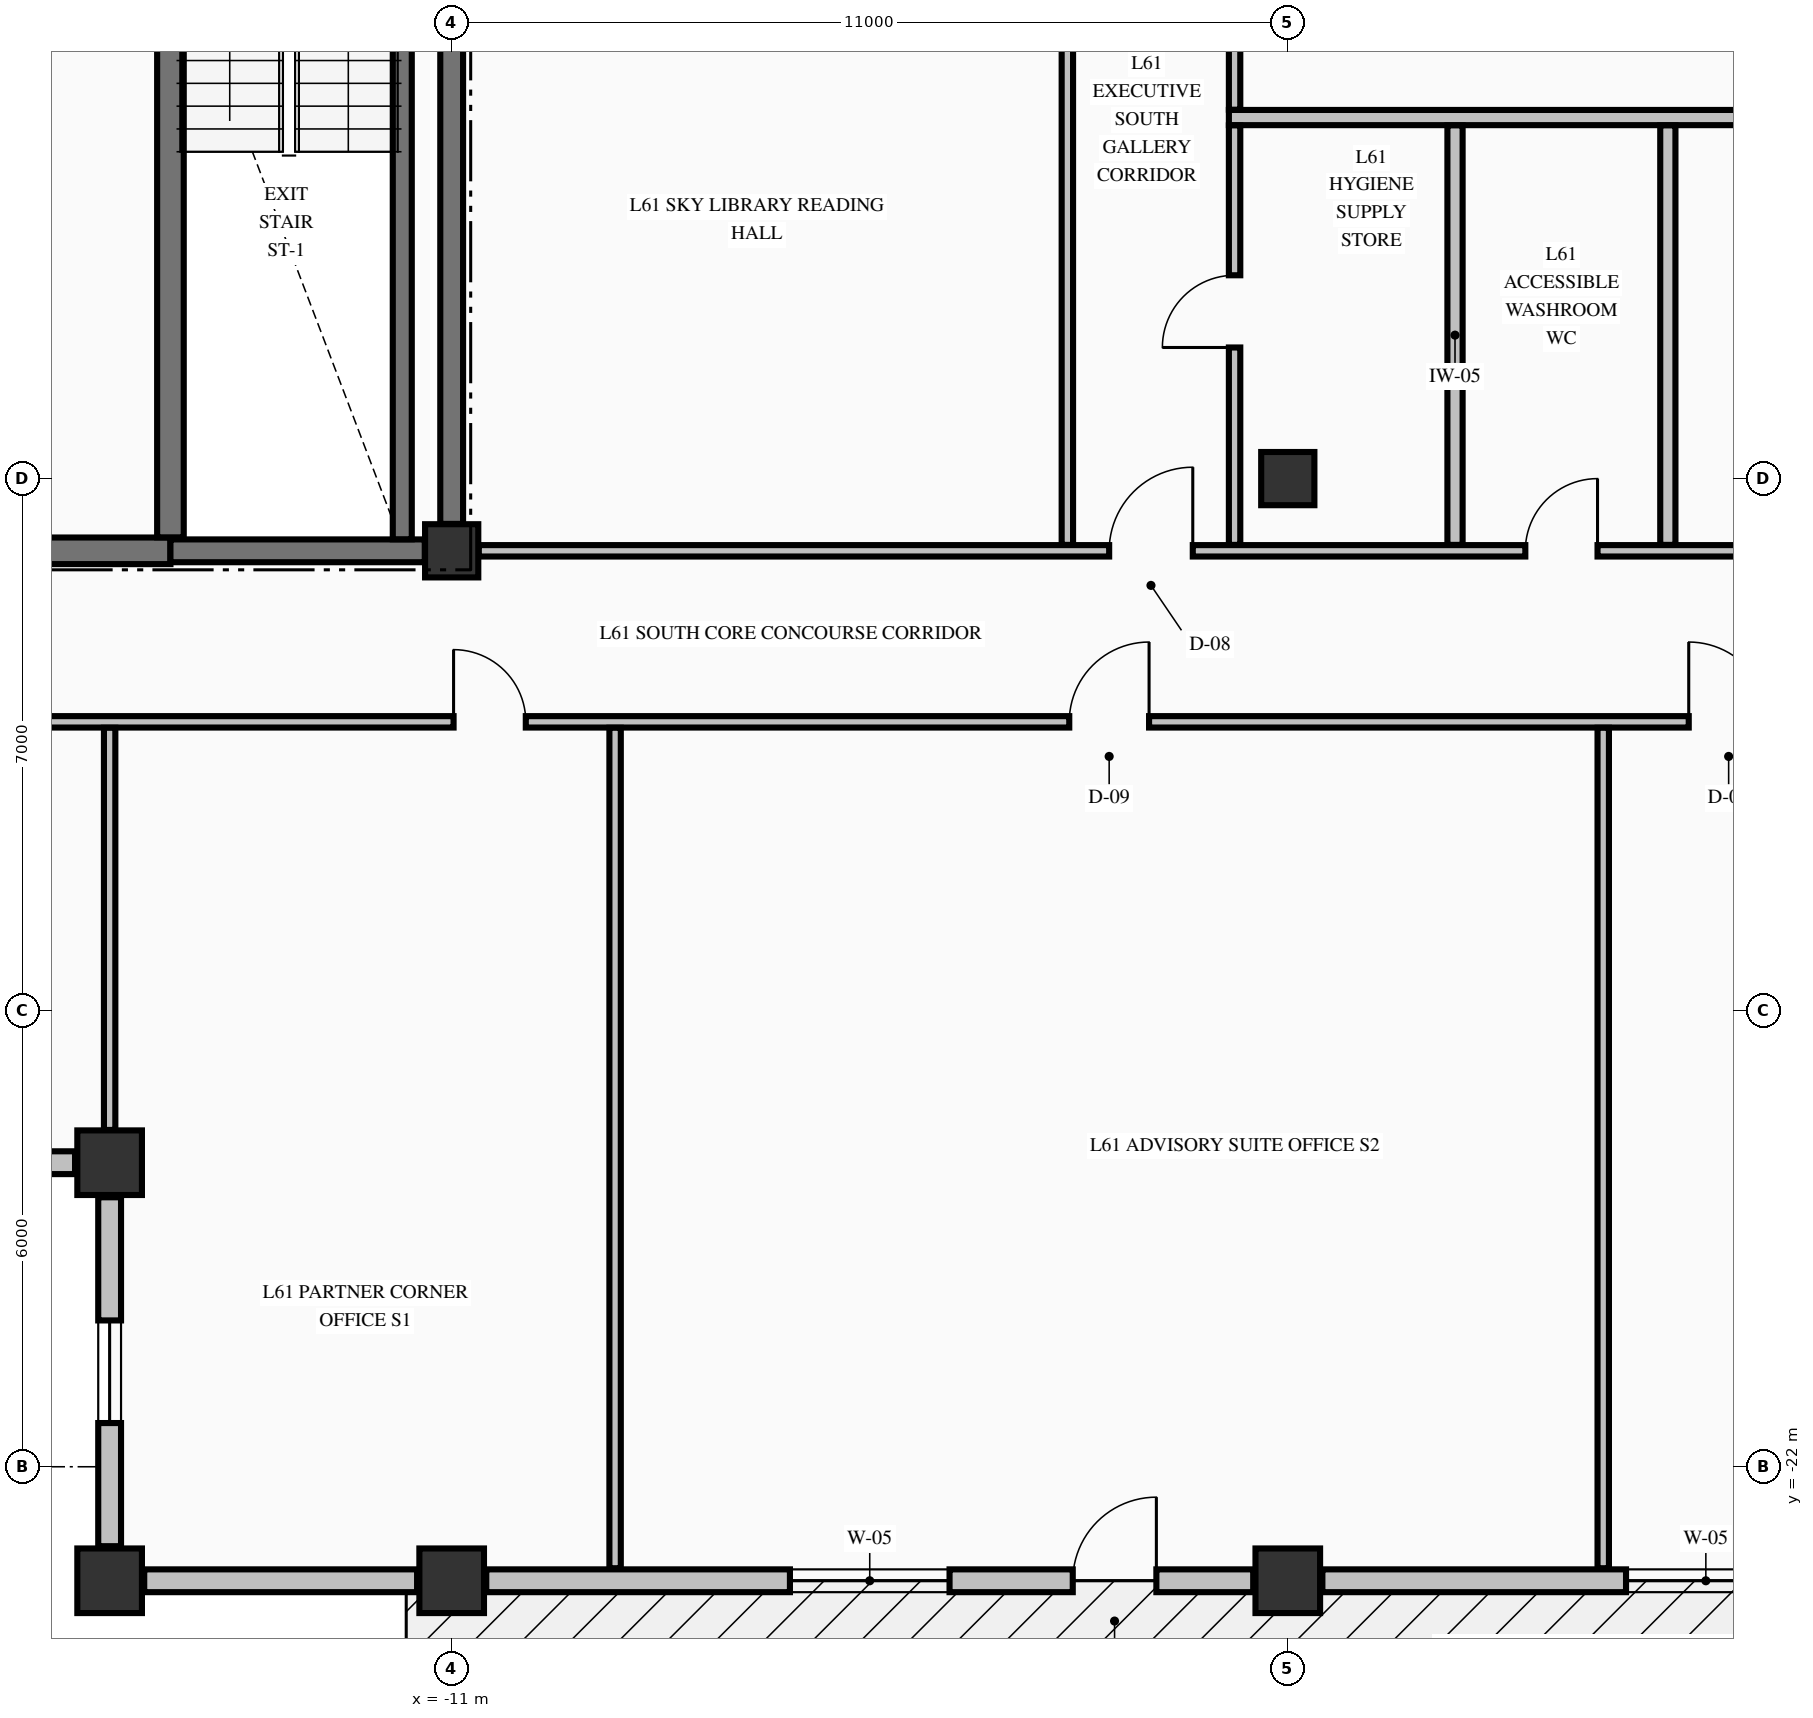
"""IFC4 building model, lengths in metres.
Left out: names, types, materials, properties, quantities, classifications, styles, units other than length and angle.
Written with IfcOpenShell. Run it as: python <this file> out.ifc"""

import sys

from ifc_helpers import new_model, si_unit, direction, frame, frame_2d, origin, origin_2d, place, context, subcontext, project, spatial, rectangle, extrude, element, fill, save


model = new_model("IFC4")
c1 = context("Model", 3, precision=1e-05, world=origin(), true_north=direction((0.0, 1.0)))
c2 = subcontext(c1, "Body", "Model", "MODEL_VIEW")
j1 = project(units=[si_unit("LENGTHUNIT", "METRE"), si_unit("PLANEANGLEUNIT", "RADIAN")], contexts=[c1])
p1 = place(None, origin())
s1 = spatial("IfcSite", under=j1, at=p1, CompositionType="ELEMENT")
p2 = place(p1, origin())
s2 = spatial("IfcBuilding", under=s1, at=p2, CompositionType="ELEMENT")
p3 = place(p2, frame((0.0, 0.0, 233.28)))
s3 = spatial("IfcBuildingStorey", under=s2, at=p3, CompositionType="ELEMENT", Elevation=233.28)
for number, where, z_axis, x_axis in (
    (1, (-15.5, -23.5, -0.25), (0.0, 0.0, 1.0), (1.0, 0.0, 0.0)),
    (2, (-11.0, -23.5, -0.25), (0.0, 0.0, 1.0), (1.0, 0.0, 0.0)),
    (3, (0.0, -23.5, -0.25), (0.0, 0.0, 1.0), (1.0, 0.0, 0.0)),
    (4, (-15.5, -18.0, -0.25), (0.0, 0.0, 1.0), (1.0, 0.0, 0.0)),
):
    element("IfcColumn", number, at=place(p3, frame(where, z_axis=z_axis, x_axis=x_axis)), inside=s3, PredefinedType="COLUMN", context=c2, shape_type="SweptSolid", body=[
        extrude(rectangle(XDim=0.85, YDim=0.85, at=origin_2d()), origin(), (0.0, 0.0, 1.0), 3.23),
    ])
for number, where, z_axis, x_axis in (
    (5, (-11.0, -9.95, -0.25), (0.0, 0.0, 1.0), (1.0, 0.0, 0.0)),
    (6, (0.0, -9.0, -0.25), (0.0, 0.0, 1.0), (1.0, 0.0, 0.0)),
):
    element("IfcColumn", number, at=place(p3, frame(where, z_axis=z_axis, x_axis=x_axis)), inside=s3, PredefinedType="COLUMN", context=c2, shape_type="SweptSolid", body=[
        extrude(rectangle(XDim=0.7, YDim=0.7, at=origin_2d()), origin(), (0.0, 0.0, 1.0), 3.23),
    ])
p4 = place(p3, frame((-20.545, -18.0, 0.0), z_axis=(0.0, 0.0, 1.0), x_axis=(1.0, 0.0, 0.0)))
e7 = element("IfcWall", 7, at=p4, inside=s3, PredefinedType="STANDARD", context=c2, shape_type="SweptSolid", body=[
    extrude(rectangle(XDim=4.59, YDim=0.3, at=frame_2d((2.295, 0.0))), origin(), (0.0, 0.0, 1.0), 2.372),
])
p5 = place(p4, frame((1.62, 0.0, 0.68)))
e8 = element("IfcOpeningElement", 8, at=p5, cuts=e7, PredefinedType="OPENING", context=c2, shape_type="SweptSolid", body=[
    extrude(rectangle(XDim=1.35, YDim=1.42, at=frame_2d((0.675, 0.71))), frame((0.0, 0.16, 0.0), z_axis=(0.0, -1.0, 0.0), x_axis=(1.0, 0.0, 0.0)), (0.0, 0.0, 1.0), 0.32),
])
p6 = place(p3, frame((-15.5, -18.455, 0.0), z_axis=(0.0, 0.0, 1.0), x_axis=(0.0, -1.0, 0.0)))
e9 = element("IfcWall", 9, at=p6, inside=s3, PredefinedType="STANDARD", context=c2, shape_type="SweptSolid", body=[
    extrude(rectangle(XDim=4.59, YDim=0.3, at=frame_2d((2.295, 0.0))), origin(), (0.0, 0.0, 1.0), 2.372),
])
p7 = place(p6, frame((1.62, 0.0, 0.68)))
e10 = element("IfcOpeningElement", 10, at=p7, cuts=e9, PredefinedType="OPENING", context=c2, shape_type="SweptSolid", body=[
    extrude(rectangle(XDim=1.35, YDim=1.42, at=frame_2d((0.675, 0.71))), frame((0.0, 0.16, 0.0), z_axis=(0.0, -1.0, 0.0), x_axis=(1.0, 0.0, 0.0)), (0.0, 0.0, 1.0), 0.32),
])
p8 = place(p3, frame((-15.045, -23.5, 0.0), z_axis=(0.0, 0.0, 1.0), x_axis=(1.0, 0.0, 0.0)))
e11 = element("IfcWall", 11, at=p8, inside=s3, PredefinedType="STANDARD", context=c2, shape_type="SweptSolid", body=[
    extrude(rectangle(XDim=3.59, YDim=0.3, at=frame_2d((1.795, 0.0))), origin(), (0.0, 0.0, 1.0), 2.372),
])
p9 = place(p3, frame((-10.545, -23.5, 0.0), z_axis=(0.0, 0.0, 1.0), x_axis=(1.0, 0.0, 0.0)))
e12 = element("IfcWall", 12, at=p9, inside=s3, PredefinedType="STANDARD", context=c2, shape_type="SweptSolid", body=[
    extrude(rectangle(XDim=10.09, YDim=0.3, at=frame_2d((5.045, 0.0))), origin(), (0.0, 0.0, 1.0), 2.372),
])
p10 = place(p9, frame((7.716, 0.0, 0.0)))
e13 = element("IfcOpeningElement", 13, at=p10, cuts=e12, PredefinedType="OPENING", context=c2, shape_type="SweptSolid", body=[
    extrude(rectangle(XDim=1.1, YDim=2.15, at=frame_2d((0.55, 1.075))), frame((0.0, 0.16, 0.0), z_axis=(0.0, -1.0, 0.0), x_axis=(1.0, 0.0, 0.0)), (0.0, 0.0, 1.0), 0.32),
])
p11 = place(p9, frame((3.995, 0.0, 0.7)))
e14 = element("IfcOpeningElement", 14, at=p11, cuts=e12, PredefinedType="OPENING", context=c2, shape_type="SweptSolid", body=[
    extrude(rectangle(XDim=2.1, YDim=1.5, at=frame_2d((1.05, 0.75))), frame((0.0, 0.16, 0.0), z_axis=(0.0, -1.0, 0.0), x_axis=(1.0, 0.0, 0.0)), (0.0, 0.0, 1.0), 0.32),
])
p12 = place(p3, frame((0.455, -23.5, 0.0), z_axis=(0.0, 0.0, 1.0), x_axis=(1.0, 0.0, 0.0)))
e15 = element("IfcWall", 15, at=p12, inside=s3, PredefinedType="STANDARD", context=c2, shape_type="SweptSolid", body=[
    extrude(rectangle(XDim=10.09, YDim=0.3, at=frame_2d((5.045, 0.0))), origin(), (0.0, 0.0, 1.0), 2.372),
])
p13 = place(p12, frame((3.995, 0.0, 0.7)))
e16 = element("IfcOpeningElement", 16, at=p13, cuts=e15, PredefinedType="OPENING", context=c2, shape_type="SweptSolid", body=[
    extrude(rectangle(XDim=2.1, YDim=1.5, at=frame_2d((1.05, 0.75))), frame((0.0, 0.16, 0.0), z_axis=(0.0, -1.0, 0.0), x_axis=(1.0, 0.0, 0.0)), (0.0, 0.0, 1.0), 0.32),
])
p14 = place(p12, frame((6.518, 0.0, 0.7)))
e17 = element("IfcOpeningElement", 17, at=p14, cuts=e15, PredefinedType="OPENING", context=c2, shape_type="SweptSolid", body=[
    extrude(rectangle(XDim=2.1, YDim=1.5, at=frame_2d((1.05, 0.75))), frame((0.0, 0.16, 0.0), z_axis=(0.0, -1.0, 0.0), x_axis=(1.0, 0.0, 0.0)), (0.0, 0.0, 1.0), 0.32),
])
p15 = place(p3, frame((-19.646, -9.95, 0.0), z_axis=(0.0, 0.0, 1.0), x_axis=(1.0, 0.0, 0.0)))
e18 = element("IfcWall", 18, at=p15, inside=s3, PredefinedType="SHEAR", context=c2, shape_type="SweptSolid", body=[
    extrude(rectangle(XDim=4.946, YDim=0.35, at=frame_2d((2.473, 0.0))), origin(), (0.0, 0.0, 1.0), 2.98),
])
p16 = place(p15, frame((0.821, 0.0, 0.0)))
e19 = element("IfcOpeningElement", 19, at=p16, cuts=e18, PredefinedType="OPENING", context=c2, shape_type="SweptSolid", body=[
    extrude(rectangle(XDim=1.05, YDim=2.15, at=frame_2d((0.525, 1.075))), frame((0.0, 0.185, 0.0), z_axis=(0.0, -1.0, 0.0), x_axis=(1.0, 0.0, 0.0)), (0.0, 0.0, 1.0), 0.37),
])
p17 = place(p3, frame((-14.7, -9.95, 0.0), z_axis=(0.0, 0.0, 1.0), x_axis=(1.0, 0.0, 0.0)))
e20 = element("IfcWall", 20, at=p17, inside=s3, PredefinedType="SHEAR", context=c2, shape_type="SweptSolid", body=[
    extrude(rectangle(XDim=3.346, YDim=0.3, at=frame_2d((1.673, 0.0))), origin(), (0.0, 0.0, 1.0), 2.98),
])
p18 = place(p3, frame((-20.075, -12.2, 0.0), z_axis=(0.0, 0.0, 1.0), x_axis=(1.0, 0.0, 0.0)))
e21 = element("IfcWall", 21, at=p18, inside=s3, PredefinedType="PARTITIONING", context=c2, shape_type="SweptSolid", body=[
    extrude(rectangle(XDim=45.91, YDim=0.15, at=frame_2d((22.955, 0.0))), origin(), (0.0, 0.0, 1.0), 2.98),
])
p19 = place(p18, frame((9.1, 0.0, 0.0)))
e22 = element("IfcOpeningElement", 22, at=p19, cuts=e21, PredefinedType="OPENING", context=c2, shape_type="SweptSolid", body=[
    extrude(rectangle(XDim=0.95, YDim=2.15, at=frame_2d((0.475, 1.075))), frame((0.0, 0.085, 0.0), z_axis=(0.0, -1.0, 0.0), x_axis=(1.0, 0.0, 0.0)), (0.0, 0.0, 1.0), 0.17),
])
p20 = place(p18, frame((17.2, 0.0, 0.0)))
e23 = element("IfcOpeningElement", 23, at=p20, cuts=e21, PredefinedType="OPENING", context=c2, shape_type="SweptSolid", body=[
    extrude(rectangle(XDim=1.05, YDim=2.15, at=frame_2d((0.525, 1.075))), frame((0.0, 0.085, 0.0), z_axis=(0.0, -1.0, 0.0), x_axis=(1.0, 0.0, 0.0)), (0.0, 0.0, 1.0), 0.17),
])
p21 = place(p18, frame((25.35, 0.0, 0.0)))
e24 = element("IfcOpeningElement", 24, at=p21, cuts=e21, PredefinedType="OPENING", context=c2, shape_type="SweptSolid", body=[
    extrude(rectangle(XDim=1.05, YDim=2.15, at=frame_2d((0.525, 1.075))), frame((0.0, 0.085, 0.0), z_axis=(0.0, -1.0, 0.0), x_axis=(1.0, 0.0, 0.0)), (0.0, 0.0, 1.0), 0.17),
])
p22 = place(p3, frame((-10.644, -9.95, 0.0), z_axis=(0.0, 0.0, 1.0), x_axis=(1.0, 0.0, 0.0)))
e25 = element("IfcWall", 25, at=p22, inside=s3, PredefinedType="PARTITIONING", context=c2, shape_type="SweptSolid", body=[
    extrude(rectangle(XDim=21.288, YDim=0.15, at=frame_2d((10.644, 0.0))), origin(), (0.0, 0.0, 1.0), 2.98),
])
p23 = place(p22, frame((8.294, 0.0, 0.0)))
e26 = element("IfcOpeningElement", 26, at=p23, cuts=e25, PredefinedType="OPENING", context=c2, shape_type="SweptSolid", body=[
    extrude(rectangle(XDim=1.1, YDim=2.15, at=frame_2d((0.55, 1.075))), frame((0.0, 0.085, 0.0), z_axis=(0.0, -1.0, 0.0), x_axis=(1.0, 0.0, 0.0)), (0.0, 0.0, 1.0), 0.17),
])
p24 = place(p22, frame((13.769, 0.0, 0.0)))
e27 = element("IfcOpeningElement", 27, at=p24, cuts=e25, PredefinedType="OPENING", context=c2, shape_type="SweptSolid", body=[
    extrude(rectangle(XDim=0.95, YDim=2.15, at=frame_2d((0.475, 1.075))), frame((0.0, 0.085, 0.0), z_axis=(0.0, -1.0, 0.0), x_axis=(1.0, 0.0, 0.0)), (0.0, 0.0, 1.0), 0.17),
])
p25 = place(p22, frame((17.994, 0.0, 0.0)))
e28 = element("IfcOpeningElement", 28, at=p25, cuts=e25, PredefinedType="OPENING", context=c2, shape_type="SweptSolid", body=[
    extrude(rectangle(XDim=0.9, YDim=2.15, at=frame_2d((0.45, 1.075))), frame((0.0, 0.085, 0.0), z_axis=(0.0, -1.0, 0.0), x_axis=(1.0, 0.0, 0.0)), (0.0, 0.0, 1.0), 0.17),
])
p26 = place(p3, frame((-0.775, -4.25, 0.0), z_axis=(0.0, 0.0, 1.0), x_axis=(1.0, 0.0, 0.0)))
e29 = element("IfcWall", 29, at=p26, inside=s3, PredefinedType="PARTITIONING", context=c2, shape_type="SweptSolid", body=[
    extrude(rectangle(XDim=11.622, YDim=0.2, at=frame_2d((5.811, 0.0))), origin(), (0.0, 0.0, 1.0), 2.98),
])
p27 = place(p3, frame((-14.7, -9.773, 0.0), z_axis=(0.0, 0.0, 1.0), x_axis=(0.0, 1.0, 0.0)))
e30 = element("IfcWall", 30, at=p27, inside=s3, PredefinedType="SHEAR", context=c2, shape_type="SweptSolid", body=[
    extrude(rectangle(XDim=9.371, YDim=0.35, at=frame_2d((4.686, 0.0))), origin(), (0.0, 0.0, 1.0), 2.98),
])
p28 = place(p3, frame((-11.65, -9.798, 0.0), z_axis=(0.0, 0.0, 1.0), x_axis=(0.0, 1.0, 0.0)))
e31 = element("IfcWall", 31, at=p28, inside=s3, PredefinedType="SOLIDWALL", context=c2, shape_type="SweptSolid", body=[
    extrude(rectangle(XDim=9.396, YDim=0.25, at=frame_2d((4.698, 0.0))), origin(), (0.0, 0.0, 1.0), 2.98),
])
p29 = place(p3, frame((-11.0, -9.596, 0.0), z_axis=(0.0, 0.0, 1.0), x_axis=(0.0, 1.0, 0.0)))
e32 = element("IfcWall", 32, at=p29, inside=s3, PredefinedType="SHEAR", context=c2, shape_type="SweptSolid", body=[
    extrude(rectangle(XDim=9.242, YDim=0.3, at=frame_2d((4.621, 0.0))), origin(), (0.0, 0.0, 1.0), 2.98),
])
p30 = place(p3, frame((-15.5, -17.569, 0.0), z_axis=(0.0, 0.0, 1.0), x_axis=(0.0, 1.0, 0.0)))
e33 = element("IfcWall", 33, at=p30, inside=s3, PredefinedType="PARTITIONING", context=c2, shape_type="SweptSolid", body=[
    extrude(rectangle(XDim=5.291, YDim=0.15, at=frame_2d((2.646, 0.0))), origin(), (0.0, 0.0, 1.0), 2.98),
])
p31 = place(p3, frame((-8.85, -23.335, 0.0), z_axis=(0.0, 0.0, 1.0), x_axis=(0.0, 1.0, 0.0)))
e34 = element("IfcWall", 34, at=p31, inside=s3, PredefinedType="PARTITIONING", context=c2, shape_type="SweptSolid", body=[
    extrude(rectangle(XDim=11.057, YDim=0.15, at=frame_2d((5.528, 0.0))), origin(), (0.0, 0.0, 1.0), 2.98),
])
p32 = place(p3, frame((-2.9, -9.872, 0.0), z_axis=(0.0, 0.0, 1.0), x_axis=(0.0, 1.0, 0.0)))
e35 = element("IfcWall", 35, at=p32, inside=s3, PredefinedType="PARTITIONING", context=c2, shape_type="SweptSolid", body=[
    extrude(rectangle(XDim=9.544, YDim=0.15, at=frame_2d((4.772, 0.0))), origin(), (0.0, 0.0, 1.0), 2.98),
])
p33 = place(p3, frame((-0.7, -9.872, 0.0), z_axis=(0.0, 0.0, 1.0), x_axis=(0.0, 1.0, 0.0)))
e36 = element("IfcWall", 36, at=p33, inside=s3, PredefinedType="PARTITIONING", context=c2, shape_type="SweptSolid", body=[
    extrude(rectangle(XDim=5.519, YDim=0.15, at=frame_2d((2.76, 0.0))), origin(), (0.0, 0.0, 1.0), 2.98),
])
p34 = place(p33, frame((2.597, 0.0, 0.0)))
e37 = element("IfcOpeningElement", 37, at=p34, cuts=e36, PredefinedType="OPENING", context=c2, shape_type="SweptSolid", body=[
    extrude(rectangle(XDim=0.95, YDim=2.15, at=frame_2d((0.475, 1.075))), frame((0.0, 0.085, 0.0), z_axis=(0.0, -1.0, 0.0), x_axis=(1.0, 0.0, 0.0)), (0.0, 0.0, 1.0), 0.17),
])
p35 = place(p3, frame((-0.7, -4.147, 0.0), z_axis=(0.0, 0.0, 1.0), x_axis=(0.0, 1.0, 0.0)))
e38 = element("IfcWall", 38, at=p35, inside=s3, PredefinedType="PARTITIONING", context=c2, shape_type="SweptSolid", body=[
    extrude(rectangle(XDim=3.819, YDim=0.15, at=frame_2d((1.91, 0.0))), origin(), (0.0, 0.0, 1.0), 2.98),
])
p36 = place(p3, frame((2.2, -9.872, 0.0), z_axis=(0.0, 0.0, 1.0), x_axis=(0.0, 1.0, 0.0)))
e39 = element("IfcWall", 39, at=p36, inside=s3, PredefinedType="PARTITIONING", context=c2, shape_type="SweptSolid", body=[
    extrude(rectangle(XDim=5.519, YDim=0.2, at=frame_2d((2.76, 0.0))), origin(), (0.0, 0.0, 1.0), 2.98),
])
p37 = place(p3, frame((4.15, -23.335, 0.0), z_axis=(0.0, 0.0, 1.0), x_axis=(0.0, 1.0, 0.0)))
e40 = element("IfcWall", 40, at=p37, inside=s3, PredefinedType="PARTITIONING", context=c2, shape_type="SweptSolid", body=[
    extrude(rectangle(XDim=11.057, YDim=0.15, at=frame_2d((5.528, 0.0))), origin(), (0.0, 0.0, 1.0), 2.98),
])
p38 = place(p3, frame((5.0, -9.872, 0.0), z_axis=(0.0, 0.0, 1.0), x_axis=(0.0, 1.0, 0.0)))
e41 = element("IfcWall", 41, at=p38, inside=s3, PredefinedType="PARTITIONING", context=c2, shape_type="SweptSolid", body=[
    extrude(rectangle(XDim=5.519, YDim=0.2, at=frame_2d((2.76, 0.0))), origin(), (0.0, 0.0, 1.0), 2.98),
])
p39 = place(p7, origin())
e42 = element("IfcWindow", 42, at=p39, inside=s3, PartitioningType="SINGLE_PANEL", PredefinedType="WINDOW", context=c2, shape_type="SweptSolid", body=[
    extrude(rectangle(XDim=1.35, YDim=1.42, at=frame_2d((0.675, 0.71))), frame((0.0, 0.03, 0.0), z_axis=(0.0, -1.0, 0.0), x_axis=(1.0, 0.0, 0.0)), (0.0, 0.0, 1.0), 0.06),
])
fill(e10, e42)
p40 = place(p10, origin())
e43 = element("IfcDoor", 43, at=p40, inside=s3, OperationType="SINGLE_SWING_RIGHT", PredefinedType="DOOR", context=c2, shape_type="SweptSolid", body=[
    extrude(rectangle(XDim=1.1, YDim=2.15, at=frame_2d((0.55, 1.075))), frame((0.0, 0.025, 0.0), z_axis=(0.0, -1.0, 0.0), x_axis=(1.0, 0.0, 0.0)), (0.0, 0.0, 1.0), 0.05),
])
fill(e13, e43)
p41 = place(p11, origin())
e44 = element("IfcWindow", 44, at=p41, inside=s3, PartitioningType="SINGLE_PANEL", PredefinedType="WINDOW", context=c2, shape_type="SweptSolid", body=[
    extrude(rectangle(XDim=2.1, YDim=1.5, at=frame_2d((1.05, 0.75))), frame((0.0, 0.03, 0.0), z_axis=(0.0, -1.0, 0.0), x_axis=(1.0, 0.0, 0.0)), (0.0, 0.0, 1.0), 0.06),
])
fill(e14, e44)
p42 = place(p13, origin())
e45 = element("IfcWindow", 45, at=p42, inside=s3, PartitioningType="SINGLE_PANEL", PredefinedType="WINDOW", context=c2, shape_type="SweptSolid", body=[
    extrude(rectangle(XDim=2.1, YDim=1.5, at=frame_2d((1.05, 0.75))), frame((0.0, 0.03, 0.0), z_axis=(0.0, -1.0, 0.0), x_axis=(1.0, 0.0, 0.0)), (0.0, 0.0, 1.0), 0.06),
])
fill(e16, e45)
p43 = place(p23, origin())
e46 = element("IfcDoor", 46, at=p43, inside=s3, OperationType="SINGLE_SWING_RIGHT", PredefinedType="DOOR", context=c2, shape_type="SweptSolid", body=[
    extrude(rectangle(XDim=1.1, YDim=2.15, at=frame_2d((0.55, 1.075))), frame((0.0, 0.025, 0.0), z_axis=(0.0, -1.0, 0.0), x_axis=(1.0, 0.0, 0.0)), (0.0, 0.0, 1.0), 0.05),
])
fill(e26, e46)
p44 = place(p19, origin())
e47 = element("IfcDoor", 47, at=p44, inside=s3, OperationType="SINGLE_SWING_LEFT", PredefinedType="DOOR", context=c2, shape_type="SweptSolid", body=[
    extrude(rectangle(XDim=0.95, YDim=2.15, at=frame_2d((0.475, 1.075))), frame((0.0, 0.025, 0.0), z_axis=(0.0, -1.0, 0.0), x_axis=(1.0, 0.0, 0.0)), (0.0, 0.0, 1.0), 0.05),
])
fill(e22, e47)
p45 = place(p20, origin())
e48 = element("IfcDoor", 48, at=p45, inside=s3, OperationType="SINGLE_SWING_RIGHT", PredefinedType="DOOR", context=c2, shape_type="SweptSolid", body=[
    extrude(rectangle(XDim=1.05, YDim=2.15, at=frame_2d((0.525, 1.075))), frame((0.0, 0.025, 0.0), z_axis=(0.0, -1.0, 0.0), x_axis=(1.0, 0.0, 0.0)), (0.0, 0.0, 1.0), 0.05),
])
fill(e23, e48)
p46 = place(p21, origin())
e49 = element("IfcDoor", 49, at=p46, inside=s3, OperationType="SINGLE_SWING_LEFT", PredefinedType="DOOR", context=c2, shape_type="SweptSolid", body=[
    extrude(rectangle(XDim=1.05, YDim=2.15, at=frame_2d((0.525, 1.075))), frame((0.0, 0.025, 0.0), z_axis=(0.0, -1.0, 0.0), x_axis=(1.0, 0.0, 0.0)), (0.0, 0.0, 1.0), 0.05),
])
fill(e24, e49)
p47 = place(p34, origin())
e50 = element("IfcDoor", 50, at=p47, inside=s3, OperationType="SINGLE_SWING_LEFT", PredefinedType="DOOR", context=c2, shape_type="SweptSolid", body=[
    extrude(rectangle(XDim=0.95, YDim=2.15, at=frame_2d((0.475, 1.075))), frame((0.0, 0.025, 0.0), z_axis=(0.0, -1.0, 0.0), x_axis=(1.0, 0.0, 0.0)), (0.0, 0.0, 1.0), 0.05),
])
fill(e37, e50)
p48 = place(p24, origin())
e51 = element("IfcDoor", 51, at=p48, inside=s3, OperationType="SINGLE_SWING_RIGHT", PredefinedType="DOOR", context=c2, shape_type="SweptSolid", body=[
    extrude(rectangle(XDim=0.95, YDim=2.15, at=frame_2d((0.475, 1.075))), frame((0.0, 0.025, 0.0), z_axis=(0.0, -1.0, 0.0), x_axis=(1.0, 0.0, 0.0)), (0.0, 0.0, 1.0), 0.05),
])
fill(e27, e51)
save(model, sys.argv[1])
